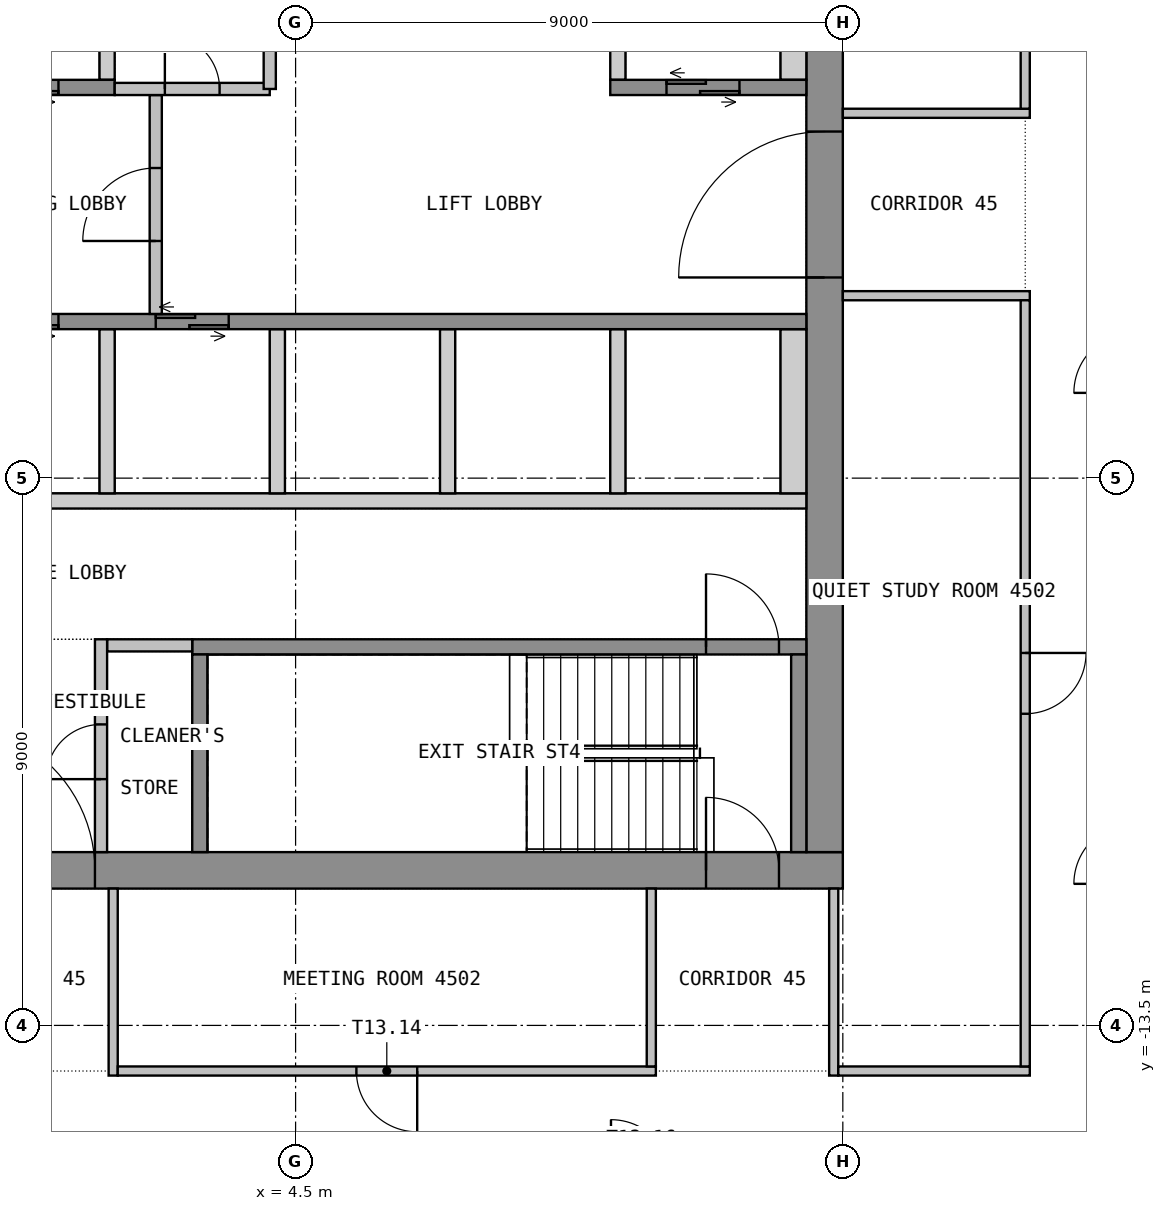
"""IFC4 building model, lengths in metres.
Left out: names, types, materials, properties, quantities, classifications, styles, units other than length and angle.
Written with IfcOpenShell. Run it as: python <this file> out.ifc"""

import sys

from ifc_helpers import new_model, si_unit, direction, frame, frame_2d, origin, place, context, subcontext, project, spatial, polyline, rectangle, outline, extrude, element, fill, save


model = new_model("IFC4")
c1 = context("Model", 3, precision=1e-05, world=origin(), true_north=direction((0.0, 1.0)))
c2 = subcontext(c1, "Body", "Model", "MODEL_VIEW")
j1 = project(units=[si_unit("LENGTHUNIT", "METRE"), si_unit("PLANEANGLEUNIT", "RADIAN")], contexts=[c1])
p1 = place(None, origin())
s1 = spatial("IfcSite", under=j1, at=p1, CompositionType="ELEMENT")
p2 = place(p1, origin())
s2 = spatial("IfcBuilding", under=s1, at=p2, CompositionType="ELEMENT")
p3 = place(p2, frame((0.0, 0.0, 183.9)))
s3 = spatial("IfcBuildingStorey", under=s2, at=p3, CompositionType="ELEMENT", Elevation=183.9)
p4 = place(p3, frame((-13.5, -10.95, 0.0), z_axis=(0.0, 0.0, 1.0), x_axis=(1.0, 0.0, 0.0)))
e1 = element("IfcWall", 1, at=p4, inside=s3, PredefinedType="SHEAR", context=c2, shape_type="SweptSolid", body=[
    extrude(rectangle(XDim=27.0, YDim=0.6, at=frame_2d((13.5, 0.0))), origin(), (0.0, 0.0, 1.0), 3.55),
])
p5 = place(p4, frame((12.3, 0.0, 0.0)))
e2 = element("IfcOpeningElement", 2, at=p5, cuts=e1, PredefinedType="OPENING", context=c2, shape_type="SweptSolid", body=[
    extrude(rectangle(XDim=2.4, YDim=2.1, at=frame_2d((1.2, 1.05))), frame((0.0, 0.31, 0.0), z_axis=(0.0, -1.0, 0.0), x_axis=(1.0, 0.0, 0.0)), (0.0, 0.0, 1.0), 0.62),
])
p6 = place(p4, frame((1.05, 0.0, 0.0)))
e3 = element("IfcOpeningElement", 3, at=p6, cuts=e1, PredefinedType="OPENING", context=c2, shape_type="SweptSolid", body=[
    extrude(rectangle(XDim=1.2, YDim=2.1, at=frame_2d((0.6, 1.05))), frame((0.0, 0.31, 0.0), z_axis=(0.0, -1.0, 0.0), x_axis=(1.0, 0.0, 0.0)), (0.0, 0.0, 1.0), 0.62),
])
p7 = place(p4, frame((24.75, 0.0, 0.0)))
e4 = element("IfcOpeningElement", 4, at=p7, cuts=e1, PredefinedType="OPENING", context=c2, shape_type="SweptSolid", body=[
    extrude(rectangle(XDim=1.2, YDim=2.1, at=frame_2d((0.6, 1.05))), frame((0.0, 0.31, 0.0), z_axis=(0.0, -1.0, 0.0), x_axis=(1.0, 0.0, 0.0)), (0.0, 0.0, 1.0), 0.62),
])
p8 = place(p3, frame((13.2, -10.65, 0.0), z_axis=(0.0, 0.0, 1.0), x_axis=(0.0, 1.0, 0.0)))
e5 = element("IfcWall", 5, at=p8, inside=s3, PredefinedType="SHEAR", context=c2, shape_type="SweptSolid", body=[
    extrude(rectangle(XDim=21.3, YDim=0.6, at=frame_2d((10.65, 0.0))), origin(), (0.0, 0.0, 1.0), 3.55),
])
p9 = place(p8, frame((9.45, 0.0, 0.0)))
e6 = element("IfcOpeningElement", 6, at=p9, cuts=e5, PredefinedType="OPENING", context=c2, shape_type="SweptSolid", body=[
    extrude(rectangle(XDim=2.4, YDim=2.1, at=frame_2d((1.2, 1.05))), frame((0.0, 0.31, 0.0), z_axis=(0.0, -1.0, 0.0), x_axis=(1.0, 0.0, 0.0)), (0.0, 0.0, 1.0), 0.62),
])
p10 = place(p3, origin())
e7 = element("IfcWall", 7, at=p10, inside=s3, PredefinedType="SHEAR", context=c2, shape_type="SweptSolid", body=[
    extrude(outline(polyline([(1.275, 2.05), (1.525, 2.05), (1.525, 4.75), (1.275, 4.75), (1.275, 2.05)])), origin(), (0.0, 0.0, 1.0), 3.55),
])
p11 = place(p3, origin())
e8 = element("IfcWall", 8, at=p11, inside=s3, PredefinedType="SHEAR", context=c2, shape_type="SweptSolid", body=[
    extrude(outline(polyline([(9.675, 2.05), (9.925, 2.05), (9.925, 4.75), (9.675, 4.75), (9.675, 2.05)])), origin(), (0.0, 0.0, 1.0), 3.55),
])
p12 = place(p3, origin())
e9 = element("IfcWall", 9, at=p12, inside=s3, PredefinedType="SHEAR", context=c2, shape_type="SweptSolid", body=[
    extrude(outline(polyline([(12.475, 2.05), (12.9, 2.05), (12.9, 4.75), (12.475, 4.75), (12.475, 2.05)])), origin(), (0.0, 0.0, 1.0), 3.55),
])
p13 = place(p3, frame((-1.525, 1.925, 0.0), z_axis=(0.0, 0.0, 1.0), x_axis=(1.0, 0.0, 0.0)))
e10 = element("IfcWall", 10, at=p13, inside=s3, PredefinedType="SHEAR", context=c2, shape_type="SweptSolid", body=[
    extrude(rectangle(XDim=3.05, YDim=0.25, at=frame_2d((1.525, 0.0))), origin(), (0.0, 0.0, 1.0), 3.55),
])
p14 = place(p13, frame((0.925, 0.0, 0.0)))
e11 = element("IfcOpeningElement", 11, at=p14, cuts=e10, PredefinedType="OPENING", context=c2, shape_type="SweptSolid", body=[
    extrude(rectangle(XDim=1.2, YDim=2.1, at=frame_2d((0.6, 1.05))), frame((0.0, 0.135, 0.0), z_axis=(0.0, -1.0, 0.0), x_axis=(1.0, 0.0, 0.0)), (0.0, 0.0, 1.0), 0.27),
])
p15 = place(p3, frame((9.675, 1.925, 0.0), z_axis=(0.0, 0.0, 1.0), x_axis=(1.0, 0.0, 0.0)))
e12 = element("IfcWall", 12, at=p15, inside=s3, PredefinedType="SHEAR", context=c2, shape_type="SweptSolid", body=[
    extrude(rectangle(XDim=3.225, YDim=0.25, at=frame_2d((1.612, 0.0))), origin(), (0.0, 0.0, 1.0), 3.55),
])
p16 = place(p15, frame((0.925, 0.0, 0.0)))
e13 = element("IfcOpeningElement", 13, at=p16, cuts=e12, PredefinedType="OPENING", context=c2, shape_type="SweptSolid", body=[
    extrude(rectangle(XDim=1.2, YDim=2.1, at=frame_2d((0.6, 1.05))), frame((0.0, 0.135, 0.0), z_axis=(0.0, -1.0, 0.0), x_axis=(1.0, 0.0, 0.0)), (0.0, 0.0, 1.0), 0.27),
])
p17 = place(p3, origin())
e14 = element("IfcWall", 14, at=p17, inside=s3, PredefinedType="SHEAR", context=c2, shape_type="SweptSolid", body=[
    extrude(outline(polyline([(-1.525, -5.0), (12.9, -5.0), (12.9, -4.75), (-1.525, -4.75), (-1.525, -5.0)])), origin(), (0.0, 0.0, 1.0), 3.55),
])
p18 = place(p3, origin())
e15 = element("IfcWall", 15, at=p18, inside=s3, PredefinedType="SHEAR", context=c2, shape_type="SweptSolid", body=[
    extrude(outline(polyline([(1.275, -4.75), (1.525, -4.75), (1.525, -2.05), (1.275, -2.05), (1.275, -4.75)])), origin(), (0.0, 0.0, 1.0), 3.55),
])
p19 = place(p3, origin())
e16 = element("IfcWall", 16, at=p19, inside=s3, PredefinedType="SHEAR", context=c2, shape_type="SweptSolid", body=[
    extrude(outline(polyline([(4.075, -4.75), (4.325, -4.75), (4.325, -2.05), (4.075, -2.05), (4.075, -4.75)])), origin(), (0.0, 0.0, 1.0), 3.55),
])
p20 = place(p3, origin())
e17 = element("IfcWall", 17, at=p20, inside=s3, PredefinedType="SHEAR", context=c2, shape_type="SweptSolid", body=[
    extrude(outline(polyline([(6.875, -4.75), (7.125, -4.75), (7.125, -2.05), (6.875, -2.05), (6.875, -4.75)])), origin(), (0.0, 0.0, 1.0), 3.55),
])
p21 = place(p3, origin())
e18 = element("IfcWall", 18, at=p21, inside=s3, PredefinedType="SHEAR", context=c2, shape_type="SweptSolid", body=[
    extrude(outline(polyline([(9.675, -4.75), (9.925, -4.75), (9.925, -2.05), (9.675, -2.05), (9.675, -4.75)])), origin(), (0.0, 0.0, 1.0), 3.55),
])
p22 = place(p3, origin())
e19 = element("IfcWall", 19, at=p22, inside=s3, PredefinedType="SHEAR", context=c2, shape_type="SweptSolid", body=[
    extrude(outline(polyline([(12.475, -4.75), (12.9, -4.75), (12.9, -2.05), (12.475, -2.05), (12.475, -4.75)])), origin(), (0.0, 0.0, 1.0), 3.55),
])
p23 = place(p3, frame((-1.525, -1.925, 0.0), z_axis=(0.0, 0.0, 1.0), x_axis=(1.0, 0.0, 0.0)))
e20 = element("IfcWall", 20, at=p23, inside=s3, PredefinedType="SHEAR", context=c2, shape_type="SweptSolid", body=[
    extrude(rectangle(XDim=14.425, YDim=0.25, at=frame_2d((7.212, 0.0))), origin(), (0.0, 0.0, 1.0), 3.55),
])
p24 = place(p23, frame((0.925, 0.0, 0.0)))
e21 = element("IfcOpeningElement", 21, at=p24, cuts=e20, PredefinedType="OPENING", context=c2, shape_type="SweptSolid", body=[
    extrude(rectangle(XDim=1.2, YDim=2.1, at=frame_2d((0.6, 1.05))), frame((0.0, 0.135, 0.0), z_axis=(0.0, -1.0, 0.0), x_axis=(1.0, 0.0, 0.0)), (0.0, 0.0, 1.0), 0.27),
])
p25 = place(p23, frame((3.725, 0.0, 0.0)))
e22 = element("IfcOpeningElement", 22, at=p25, cuts=e20, PredefinedType="OPENING", context=c2, shape_type="SweptSolid", body=[
    extrude(rectangle(XDim=1.2, YDim=2.1, at=frame_2d((0.6, 1.05))), frame((0.0, 0.135, 0.0), z_axis=(0.0, -1.0, 0.0), x_axis=(1.0, 0.0, 0.0)), (0.0, 0.0, 1.0), 0.27),
])
p26 = place(p3, frame((2.2, -1.8, 0.0), z_axis=(0.0, 0.0, 1.0), x_axis=(0.0, 1.0, 0.0)))
e23 = element("IfcWall", 23, at=p26, inside=s3, PredefinedType="PARTITIONING", context=c2, shape_type="SweptSolid", body=[
    extrude(rectangle(XDim=3.6, YDim=0.2, at=frame_2d((1.8, 0.0))), origin(), (0.0, 0.0, 1.0), 3.55),
])
p27 = place(p26, frame((1.2, 0.0, 0.0)))
e24 = element("IfcOpeningElement", 24, at=p27, cuts=e23, PredefinedType="OPENING", context=c2, shape_type="SweptSolid", body=[
    extrude(rectangle(XDim=1.2, YDim=2.1, at=frame_2d((0.6, 1.05))), frame((0.0, 0.11, 0.0), z_axis=(0.0, -1.0, 0.0), x_axis=(1.0, 0.0, 0.0)), (0.0, 0.0, 1.0), 0.22),
])
p28 = place(p3, frame((2.8, -7.275, 0.0), z_axis=(0.0, 0.0, 1.0), x_axis=(1.0, 0.0, 0.0)))
e25 = element("IfcWall", 25, at=p28, inside=s3, PredefinedType="SHEAR", context=c2, shape_type="SweptSolid", body=[
    extrude(rectangle(XDim=10.1, YDim=0.25, at=frame_2d((5.05, 0.0))), origin(), (0.0, 0.0, 1.0), 3.55),
])
p29 = place(p28, frame((8.45, 0.0, 0.0)))
e26 = element("IfcOpeningElement", 26, at=p29, cuts=e25, PredefinedType="OPENING", context=c2, shape_type="SweptSolid", body=[
    extrude(rectangle(XDim=1.2, YDim=2.1, at=frame_2d((0.6, 1.05))), frame((0.0, 0.135, 0.0), z_axis=(0.0, -1.0, 0.0), x_axis=(1.0, 0.0, 0.0)), (0.0, 0.0, 1.0), 0.27),
])
for number, where, z_axis, x_axis in (
    (27, (2.925, -10.65, 0.0), (0.0, 0.0, 1.0), (0.0, 1.0, 0.0)),
    (28, (12.775, -10.65, 0.0), (0.0, 0.0, 1.0), (0.0, 1.0, 0.0)),
):
    element("IfcWall", number, at=place(p3, frame(where, z_axis=z_axis, x_axis=x_axis)), inside=s3, PredefinedType="SHEAR", context=c2, shape_type="SweptSolid", body=[
        extrude(rectangle(XDim=3.25, YDim=0.25, at=frame_2d((1.625, 0.0))), origin(), (0.0, 0.0, 1.0), 3.55),
    ])
p30 = place(p3, frame((1.4, -7.25, 0.0), z_axis=(0.0, 0.0, 1.0), x_axis=(1.0, 0.0, 0.0)))
e29 = element("IfcWall", 29, at=p30, inside=s3, PredefinedType="PARTITIONING", context=c2, shape_type="SweptSolid", body=[
    extrude(rectangle(XDim=1.4, YDim=0.2, at=frame_2d((0.7, 0.0))), origin(), (0.0, 0.0, 1.0), 3.55),
])
p31 = place(p3, frame((1.3, -10.65, 0.0), z_axis=(0.0, 0.0, 1.0), x_axis=(0.0, 1.0, 0.0)))
e30 = element("IfcWall", 30, at=p31, inside=s3, PredefinedType="PARTITIONING", context=c2, shape_type="SweptSolid", body=[
    extrude(rectangle(XDim=3.5, YDim=0.2, at=frame_2d((1.75, 0.0))), origin(), (0.0, 0.0, 1.0), 3.55),
])
p32 = place(p31, frame((1.2, 0.0, 0.0)))
e31 = element("IfcOpeningElement", 31, at=p32, cuts=e30, PredefinedType="OPENING", context=c2, shape_type="SweptSolid", body=[
    extrude(rectangle(XDim=0.9, YDim=2.1, at=frame_2d((0.45, 1.05))), frame((0.0, 0.11, 0.0), z_axis=(0.0, -1.0, 0.0), x_axis=(1.0, 0.0, 0.0)), (0.0, 0.0, 1.0), 0.22),
])
p33 = place(p3, frame((1.525, 1.9, 0.0), z_axis=(0.0, 0.0, 1.0), x_axis=(1.0, 0.0, 0.0)))
e32 = element("IfcWall", 32, at=p33, inside=s3, PredefinedType="PARTITIONING", context=c2, shape_type="SweptSolid", body=[
    extrude(rectangle(XDim=2.55, YDim=0.2, at=frame_2d((1.275, 0.0))), origin(), (0.0, 0.0, 1.0), 3.55),
])
p34 = place(p33, frame((0.825, 0.0, 0.0)))
e33 = element("IfcOpeningElement", 33, at=p34, cuts=e32, PredefinedType="OPENING", context=c2, shape_type="SweptSolid", body=[
    extrude(rectangle(XDim=0.9, YDim=2.1, at=frame_2d((0.45, 1.05))), frame((0.0, 0.11, 0.0), z_axis=(0.0, -1.0, 0.0), x_axis=(1.0, 0.0, 0.0)), (0.0, 0.0, 1.0), 0.22),
])
p35 = place(p3, frame((4.075, 1.9, 0.0), z_axis=(0.0, 0.0, 1.0), x_axis=(0.0, 1.0, 0.0)))
e34 = element("IfcWall", 34, at=p35, inside=s3, PredefinedType="PARTITIONING", context=c2, shape_type="SweptSolid", body=[
    extrude(rectangle(XDim=1.15, YDim=0.2, at=frame_2d((0.575, 0.0))), origin(), (0.0, 0.0, 1.0), 3.55),
])
p36 = place(p3, frame((1.5, -14.325, 0.0), z_axis=(0.0, 0.0, 1.0), x_axis=(0.0, 1.0, 0.0)))
e35 = element("IfcWall", 35, at=p36, inside=s3, PredefinedType="PARTITIONING", context=c2, shape_type="SweptSolid", body=[
    extrude(rectangle(XDim=3.075, YDim=0.15, at=frame_2d((1.538, 0.0))), origin(), (0.0, 0.0, 1.0), 3.55),
])
p37 = place(p3, frame((10.425, -14.25, 0.0), z_axis=(0.0, 0.0, 1.0), x_axis=(-1.0, 0.0, 0.0)))
e36 = element("IfcWall", 36, at=p37, inside=s3, PredefinedType="PARTITIONING", context=c2, shape_type="SweptSolid", body=[
    extrude(rectangle(XDim=8.85, YDim=0.15, at=frame_2d((4.425, 0.0))), origin(), (0.0, 0.0, 1.0), 3.55),
])
p38 = place(p37, frame((3.925, 0.0, 0.0)))
e37 = element("IfcOpeningElement", 37, at=p38, cuts=e36, PredefinedType="OPENING", context=c2, shape_type="SweptSolid", body=[
    extrude(rectangle(XDim=1.0, YDim=2.1, at=frame_2d((0.5, 1.05))), frame((0.0, 0.085, 0.0), z_axis=(0.0, -1.0, 0.0), x_axis=(1.0, 0.0, 0.0)), (0.0, 0.0, 1.0), 0.17),
])
p39 = place(p3, frame((10.35, -11.25, 0.0), z_axis=(0.0, 0.0, 1.0), x_axis=(0.0, -1.0, 0.0)))
e38 = element("IfcWall", 38, at=p39, inside=s3, PredefinedType="PARTITIONING", context=c2, shape_type="SweptSolid", body=[
    extrude(rectangle(XDim=2.925, YDim=0.15, at=frame_2d((1.462, 0.0))), origin(), (0.0, 0.0, 1.0), 3.55),
])
p40 = place(p3, frame((13.35, -14.325, 0.0), z_axis=(0.0, 0.0, 1.0), x_axis=(0.0, 1.0, 0.0)))
e39 = element("IfcWall", 39, at=p40, inside=s3, PredefinedType="PARTITIONING", context=c2, shape_type="SweptSolid", body=[
    extrude(rectangle(XDim=3.075, YDim=0.15, at=frame_2d((1.538, 0.0))), origin(), (0.0, 0.0, 1.0), 3.55),
])
p41 = place(p3, frame((16.575, -14.25, 0.0), z_axis=(0.0, 0.0, 1.0), x_axis=(-1.0, 0.0, 0.0)))
e40 = element("IfcWall", 40, at=p41, inside=s3, PredefinedType="PARTITIONING", context=c2, shape_type="SweptSolid", body=[
    extrude(rectangle(XDim=3.15, YDim=0.15, at=frame_2d((1.575, 0.0))), origin(), (0.0, 0.0, 1.0), 3.55),
])
for number, where, z_axis, x_axis in (
    (41, (13.5, -1.5, 0.0), (0.0, 0.0, 1.0), (1.0, 0.0, 0.0)),
    (42, (16.575, 1.5, 0.0), (0.0, 0.0, 1.0), (-1.0, 0.0, 0.0)),
):
    element("IfcWall", number, at=place(p3, frame(where, z_axis=z_axis, x_axis=x_axis)), inside=s3, PredefinedType="PARTITIONING", context=c2, shape_type="SweptSolid", body=[
        extrude(rectangle(XDim=3.075, YDim=0.15, at=frame_2d((1.538, 0.0))), origin(), (0.0, 0.0, 1.0), 3.55),
    ])
p42 = place(p3, frame((16.5, -1.575, 0.0), z_axis=(0.0, 0.0, 1.0), x_axis=(0.0, -1.0, 0.0)))
e43 = element("IfcWall", 43, at=p42, inside=s3, PredefinedType="PARTITIONING", context=c2, shape_type="SweptSolid", body=[
    extrude(rectangle(XDim=12.6, YDim=0.15, at=frame_2d((6.3, 0.0))), origin(), (0.0, 0.0, 1.0), 3.55),
])
p43 = place(p42, frame((5.8, 0.0, 0.0)))
e44 = element("IfcOpeningElement", 44, at=p43, cuts=e43, PredefinedType="OPENING", context=c2, shape_type="SweptSolid", body=[
    extrude(rectangle(XDim=1.0, YDim=2.1, at=frame_2d((0.5, 1.05))), frame((0.0, 0.085, 0.0), z_axis=(0.0, -1.0, 0.0), x_axis=(1.0, 0.0, 0.0)), (0.0, 0.0, 1.0), 0.17),
])
p44 = place(p3, frame((16.5, 14.175, 0.0), z_axis=(0.0, 0.0, 1.0), x_axis=(0.0, -1.0, 0.0)))
e45 = element("IfcWall", 45, at=p44, inside=s3, PredefinedType="PARTITIONING", context=c2, shape_type="SweptSolid", body=[
    extrude(rectangle(XDim=12.6, YDim=0.15, at=frame_2d((6.3, 0.0))), origin(), (0.0, 0.0, 1.0), 3.55),
])
p45 = place(p44, frame((5.8, 0.0, 0.0)))
e46 = element("IfcOpeningElement", 46, at=p45, cuts=e45, PredefinedType="OPENING", context=c2, shape_type="SweptSolid", body=[
    extrude(rectangle(XDim=1.0, YDim=2.1, at=frame_2d((0.5, 1.05))), frame((0.0, 0.085, 0.0), z_axis=(0.0, -1.0, 0.0), x_axis=(1.0, 0.0, 0.0)), (0.0, 0.0, 1.0), 0.17),
])
p46 = place(p9, origin())
e47 = element("IfcDoor", 47, at=p46, inside=s3, OperationType="DOUBLE_DOOR_DOUBLE_SWING", PredefinedType="DOOR", context=c2, shape_type="SweptSolid", body=[
    extrude(rectangle(XDim=2.4, YDim=2.1, at=frame_2d((1.2, 1.05))), frame((0.0, 0.025, 0.0), z_axis=(0.0, -1.0, 0.0), x_axis=(1.0, 0.0, 0.0)), (0.0, 0.0, 1.0), 0.05),
])
fill(e6, e47)
p47 = place(p5, origin())
e48 = element("IfcDoor", 48, at=p47, inside=s3, OperationType="DOUBLE_DOOR_DOUBLE_SWING", PredefinedType="DOOR", context=c2, shape_type="SweptSolid", body=[
    extrude(rectangle(XDim=2.4, YDim=2.1, at=frame_2d((1.2, 1.05))), frame((0.0, 0.025, 0.0), z_axis=(0.0, -1.0, 0.0), x_axis=(1.0, 0.0, 0.0)), (0.0, 0.0, 1.0), 0.05),
])
fill(e2, e48)
p48 = place(p7, origin())
e49 = element("IfcDoor", 49, at=p48, inside=s3, OperationType="SINGLE_SWING_RIGHT", PredefinedType="DOOR", context=c2, shape_type="SweptSolid", body=[
    extrude(rectangle(XDim=1.2, YDim=2.1, at=frame_2d((0.6, 1.05))), frame((0.0, 0.025, 0.0), z_axis=(0.0, -1.0, 0.0), x_axis=(1.0, 0.0, 0.0)), (0.0, 0.0, 1.0), 0.05),
])
fill(e4, e49)
p49 = place(p14, origin())
e50 = element("IfcDoor", 50, at=p49, inside=s3, OperationType="DOUBLE_DOOR_SLIDING", PredefinedType="DOOR", context=c2, shape_type="SweptSolid", body=[
    extrude(rectangle(XDim=1.2, YDim=2.1, at=frame_2d((0.6, 1.05))), frame((0.0, 0.025, 0.0), z_axis=(0.0, -1.0, 0.0), x_axis=(1.0, 0.0, 0.0)), (0.0, 0.0, 1.0), 0.05),
])
fill(e11, e50)
p50 = place(p16, origin())
e51 = element("IfcDoor", 51, at=p50, inside=s3, OperationType="DOUBLE_DOOR_SLIDING", PredefinedType="DOOR", context=c2, shape_type="SweptSolid", body=[
    extrude(rectangle(XDim=1.2, YDim=2.1, at=frame_2d((0.6, 1.05))), frame((0.0, 0.025, 0.0), z_axis=(0.0, -1.0, 0.0), x_axis=(1.0, 0.0, 0.0)), (0.0, 0.0, 1.0), 0.05),
])
fill(e13, e51)
p51 = place(p24, origin())
e52 = element("IfcDoor", 52, at=p51, inside=s3, OperationType="DOUBLE_DOOR_SLIDING", PredefinedType="DOOR", context=c2, shape_type="SweptSolid", body=[
    extrude(rectangle(XDim=1.2, YDim=2.1, at=frame_2d((0.6, 1.05))), frame((0.0, 0.025, 0.0), z_axis=(0.0, -1.0, 0.0), x_axis=(1.0, 0.0, 0.0)), (0.0, 0.0, 1.0), 0.05),
])
fill(e21, e52)
p52 = place(p25, origin())
e53 = element("IfcDoor", 53, at=p52, inside=s3, OperationType="DOUBLE_DOOR_SLIDING", PredefinedType="DOOR", context=c2, shape_type="SweptSolid", body=[
    extrude(rectangle(XDim=1.2, YDim=2.1, at=frame_2d((0.6, 1.05))), frame((0.0, 0.025, 0.0), z_axis=(0.0, -1.0, 0.0), x_axis=(1.0, 0.0, 0.0)), (0.0, 0.0, 1.0), 0.05),
])
fill(e22, e53)
p53 = place(p27, origin())
e54 = element("IfcDoor", 54, at=p53, inside=s3, OperationType="SINGLE_SWING_LEFT", PredefinedType="DOOR", context=c2, shape_type="SweptSolid", body=[
    extrude(rectangle(XDim=1.2, YDim=2.1, at=frame_2d((0.6, 1.05))), frame((0.0, 0.025, 0.0), z_axis=(0.0, -1.0, 0.0), x_axis=(1.0, 0.0, 0.0)), (0.0, 0.0, 1.0), 0.05),
])
fill(e24, e54)
p54 = place(p29, origin())
e55 = element("IfcDoor", 55, at=p54, inside=s3, OperationType="SINGLE_SWING_LEFT", PredefinedType="DOOR", context=c2, shape_type="SweptSolid", body=[
    extrude(rectangle(XDim=1.2, YDim=2.1, at=frame_2d((0.6, 1.05))), frame((0.0, 0.025, 0.0), z_axis=(0.0, -1.0, 0.0), x_axis=(1.0, 0.0, 0.0)), (0.0, 0.0, 1.0), 0.05),
])
fill(e26, e55)
p55 = place(p32, origin())
e56 = element("IfcDoor", 56, at=p55, inside=s3, OperationType="SINGLE_SWING_LEFT", PredefinedType="DOOR", context=c2, shape_type="SweptSolid", body=[
    extrude(rectangle(XDim=0.9, YDim=2.1, at=frame_2d((0.45, 1.05))), frame((0.0, 0.025, 0.0), z_axis=(0.0, -1.0, 0.0), x_axis=(1.0, 0.0, 0.0)), (0.0, 0.0, 1.0), 0.05),
])
fill(e31, e56)
p56 = place(p34, origin())
e57 = element("IfcDoor", 57, at=p56, inside=s3, OperationType="SINGLE_SWING_LEFT", PredefinedType="DOOR", context=c2, shape_type="SweptSolid", body=[
    extrude(rectangle(XDim=0.9, YDim=2.1, at=frame_2d((0.45, 1.05))), frame((0.0, 0.025, 0.0), z_axis=(0.0, -1.0, 0.0), x_axis=(1.0, 0.0, 0.0)), (0.0, 0.0, 1.0), 0.05),
])
fill(e33, e57)
p57 = place(p38, origin())
e58 = element("IfcDoor", 58, at=p57, inside=s3, OperationType="SINGLE_SWING_RIGHT", PredefinedType="DOOR", context=c2, shape_type="SweptSolid", body=[
    extrude(rectangle(XDim=1.0, YDim=2.1, at=frame_2d((0.5, 1.05))), frame((0.0, 0.025, 0.0), z_axis=(0.0, -1.0, 0.0), x_axis=(1.0, 0.0, 0.0)), (0.0, 0.0, 1.0), 0.05),
])
fill(e37, e58)
p58 = place(p43, origin())
e59 = element("IfcDoor", 59, at=p58, inside=s3, OperationType="SINGLE_SWING_LEFT", PredefinedType="DOOR", context=c2, shape_type="SweptSolid", body=[
    extrude(rectangle(XDim=1.0, YDim=2.1, at=frame_2d((0.5, 1.05))), frame((0.0, 0.025, 0.0), z_axis=(0.0, -1.0, 0.0), x_axis=(1.0, 0.0, 0.0)), (0.0, 0.0, 1.0), 0.05),
])
fill(e44, e59)
save(model, sys.argv[1])
